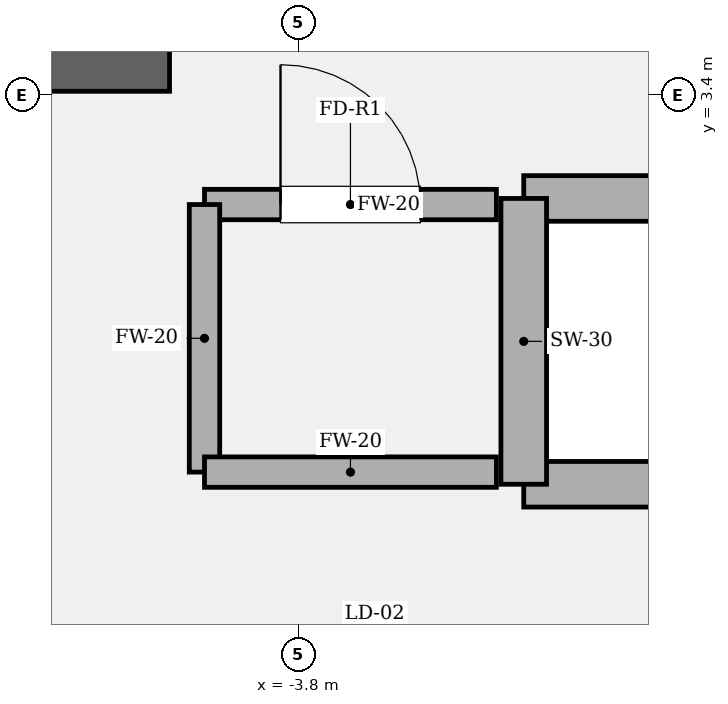
"""IFC4 building model, lengths in metres.
Left out: names, types, materials, properties, quantities, classifications, styles, units other than length and angle.
Written with IfcOpenShell. Run it as: python <this file> out.ifc"""

import sys

from ifc_helpers import new_model, si_unit, direction, frame, frame_2d, origin, place, context, subcontext, project, spatial, rectangle, extrude, element, fill, save


model = new_model("IFC4")
c1 = context("Model", 3, precision=1e-05, world=origin(), true_north=direction((0.0, 1.0)))
c2 = subcontext(c1, "Body", "Model", "MODEL_VIEW")
j1 = project(units=[si_unit("LENGTHUNIT", "METRE"), si_unit("PLANEANGLEUNIT", "RADIAN")], contexts=[c1])
p1 = place(None, origin())
s1 = spatial("IfcSite", under=j1, at=p1, CompositionType="ELEMENT")
p2 = place(p1, origin())
s2 = spatial("IfcBuilding", under=s1, at=p2, CompositionType="ELEMENT")
p3 = place(p2, frame((0.0, 0.0, 271.65)))
s3 = spatial("IfcBuildingStorey", under=s2, at=p3, CompositionType="ELEMENT", Elevation=271.65)
p4 = place(p3, frame((-9.925, 3.6, 0.0), z_axis=(0.0, 0.0, 1.0), x_axis=(1.0, 0.0, 0.0)))
e1 = element("IfcWall", 1, at=p4, inside=s3, PredefinedType="SOLIDWALL", context=c2, shape_type="SweptSolid", body=[
    extrude(rectangle(XDim=5.275, YDim=0.35, at=frame_2d((2.638, 0.0))), origin(), (0.0, 0.0, 1.0), 4.05),
])
for number, where, z_axis, x_axis in (
    (2, (-2.32, 0.84, 0.0), (0.0, 0.0, 1.0), (1.0, 0.0, 0.0)),
    (3, (-2.32, 2.72, 0.0), (0.0, 0.0, 1.0), (1.0, 0.0, 0.0)),
):
    element("IfcWall", number, at=place(p3, frame(where, z_axis=z_axis, x_axis=x_axis)), inside=s3, PredefinedType="SOLIDWALL", context=c2, shape_type="SweptSolid", body=[
        extrude(rectangle(XDim=4.64, YDim=0.3, at=frame_2d((2.32, 0.0))), origin(), (0.0, 0.0, 1.0), 3.85),
    ])
p5 = place(p3, frame((-2.32, 0.84, 0.0), z_axis=(0.0, 0.0, 1.0), x_axis=(0.0, 1.0, 0.0)))
e4 = element("IfcWall", 4, at=p5, inside=s3, PredefinedType="SOLIDWALL", context=c2, shape_type="SweptSolid", body=[
    extrude(rectangle(XDim=1.88, YDim=0.3, at=frame_2d((0.94, 0.0))), origin(), (0.0, 0.0, 1.0), 3.85),
])
p6 = place(p3, frame((-2.5, 2.68, 0.0), z_axis=(0.0, 0.0, 1.0), x_axis=(-1.0, 0.0, 0.0)))
e5 = element("IfcWall", 5, at=p6, inside=s3, PredefinedType="SOLIDWALL", context=c2, shape_type="SweptSolid", body=[
    extrude(rectangle(XDim=1.92, YDim=0.2, at=frame_2d((0.96, 0.0))), origin(), (0.0, 0.0, 1.0), 3.85),
])
p7 = place(p6, frame((0.5, 0.0, 0.0)))
e6 = element("IfcOpeningElement", 6, at=p7, cuts=e5, PredefinedType="OPENING", context=c2, shape_type="SweptSolid", body=[
    extrude(rectangle(XDim=0.92, YDim=2.1, at=frame_2d((0.46, 1.05))), frame((0.0, 0.11, 0.0), z_axis=(0.0, -1.0, 0.0), x_axis=(1.0, 0.0, 0.0)), (0.0, 0.0, 1.0), 0.22),
])
p8 = place(p3, frame((-4.42, 2.68, 0.0), z_axis=(0.0, 0.0, 1.0), x_axis=(0.0, -1.0, 0.0)))
e7 = element("IfcWall", 7, at=p8, inside=s3, PredefinedType="SOLIDWALL", context=c2, shape_type="SweptSolid", body=[
    extrude(rectangle(XDim=1.76, YDim=0.2, at=frame_2d((0.88, 0.0))), origin(), (0.0, 0.0, 1.0), 3.85),
])
p9 = place(p3, frame((-4.42, 0.92, 0.0), z_axis=(0.0, 0.0, 1.0), x_axis=(1.0, 0.0, 0.0)))
e8 = element("IfcWall", 8, at=p9, inside=s3, PredefinedType="SOLIDWALL", context=c2, shape_type="SweptSolid", body=[
    extrude(rectangle(XDim=1.92, YDim=0.2, at=frame_2d((0.96, 0.0))), origin(), (0.0, 0.0, 1.0), 3.85),
])
p10 = place(p7, origin())
e9 = element("IfcDoor", 9, at=p10, inside=s3, OperationType="SINGLE_SWING_RIGHT", PredefinedType="DOOR", context=c2, shape_type="SweptSolid", body=[
    extrude(rectangle(XDim=0.92, YDim=2.1, at=frame_2d((0.46, 1.05))), frame((0.0, 0.025, 0.0), z_axis=(0.0, -1.0, 0.0), x_axis=(1.0, 0.0, 0.0)), (0.0, 0.0, 1.0), 0.05),
])
fill(e6, e9)
save(model, sys.argv[1])
